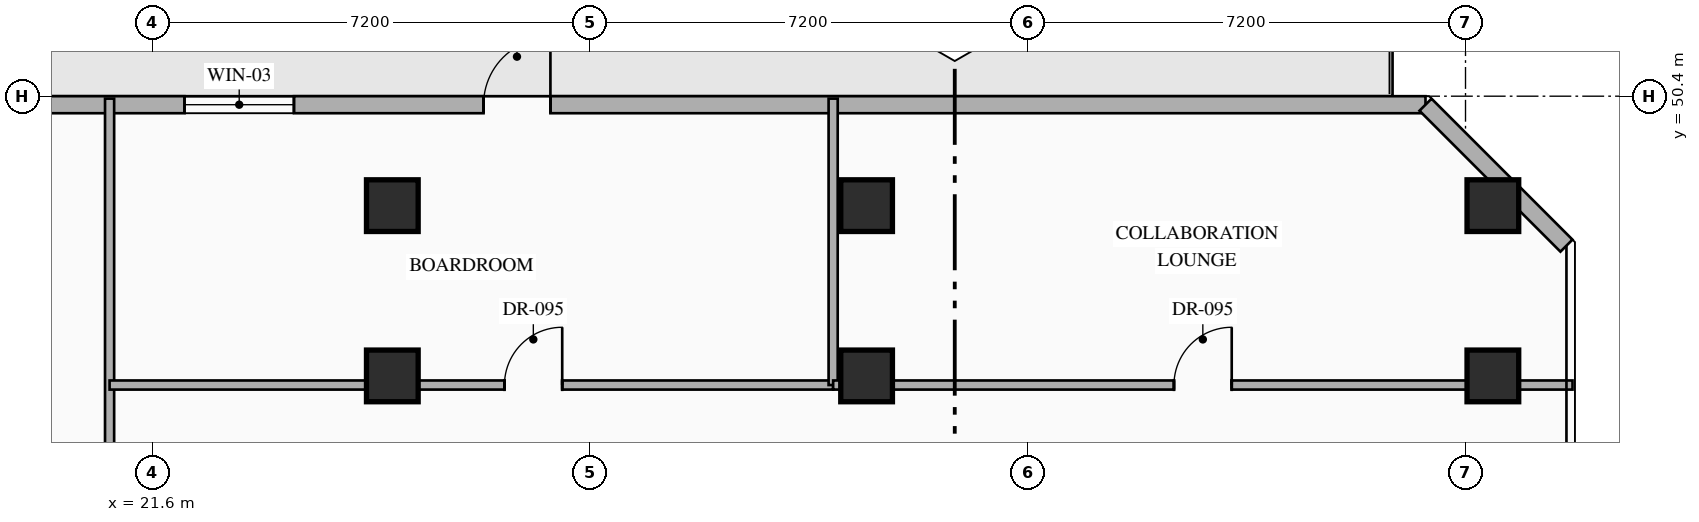
"""IFC4 building model, lengths in metres.
Left out: names, types, materials, properties, quantities, classifications, styles, units other than length and angle.
Written with IfcOpenShell. Run it as: python <this file> out.ifc"""

import sys

from ifc_helpers import new_model, si_unit, direction, frame, frame_2d, origin, origin_2d, place, context, subcontext, project, spatial, rectangle, hollow_rectangle, extrude, element, fill, save


model = new_model("IFC4")
c1 = context("Model", 3, precision=1e-05, world=origin(), true_north=direction((0.0, 1.0)))
c2 = subcontext(c1, "Body", "Model", "MODEL_VIEW")
j1 = project(units=[si_unit("LENGTHUNIT", "METRE"), si_unit("PLANEANGLEUNIT", "RADIAN")], contexts=[c1])
p1 = place(None, origin())
s1 = spatial("IfcSite", under=j1, at=p1, CompositionType="ELEMENT")
p2 = place(p1, origin())
s2 = spatial("IfcBuilding", under=s1, at=p2, CompositionType="ELEMENT")
p3 = place(p2, frame((0.0, 0.0, 156.45)))
s3 = spatial("IfcBuildingStorey", under=s2, at=p3, CompositionType="ELEMENT", Elevation=156.45)
for number, where, z_axis, x_axis in (
    (1, (25.55, 45.8, 0.0), (0.0, 0.0, 1.0), (1.0, 0.0, 0.0)),
    (2, (33.35, 45.8, 0.0), (0.0, 0.0, 1.0), (1.0, 0.0, 0.0)),
    (3, (43.65, 45.8, 0.0), (0.0, 0.0, 1.0), (1.0, 0.0, 0.0)),
    (4, (25.55, 48.6, 0.0), (0.0, 0.0, 1.0), (1.0, 0.0, 0.0)),
    (5, (33.35, 48.6, 0.0), (0.0, 0.0, 1.0), (1.0, 0.0, 0.0)),
    (6, (43.65, 48.6, 0.0), (0.0, 0.0, 1.0), (1.0, 0.0, 0.0)),
):
    element("IfcColumn", number, at=place(p3, frame(where, z_axis=z_axis, x_axis=x_axis)), inside=s3, PredefinedType="COLUMN", context=c2, shape_type="SweptSolid", body=[
        extrude(hollow_rectangle(XDim=0.85, YDim=0.85, WallThickness=0.032, at=origin_2d()), origin(), (0.0, 0.0, 1.0), 3.6),
    ])
p4 = place(p3, frame((12.058, 50.26, 0.0), z_axis=(0.0, 0.0, 1.0), x_axis=(1.0, 0.0, 0.0)))
e7 = element("IfcWall", 7, at=p4, inside=s3, PredefinedType="STANDARD", context=c2, shape_type="SweptSolid", body=[
    extrude(rectangle(XDim=30.484, YDim=0.28, at=frame_2d((15.242, 0.0))), origin(), (0.0, 0.0, 1.0), 3.35),
])
p5 = place(p4, frame((14.992, 0.0, 0.0)))
e8 = element("IfcOpeningElement", 8, at=p5, cuts=e7, PredefinedType="OPENING", context=c2, shape_type="SweptSolid", body=[
    extrude(rectangle(XDim=1.1, YDim=2.2, at=frame_2d((0.55, 1.1))), frame((0.0, 0.15, 0.0), z_axis=(0.0, -1.0, 0.0), x_axis=(1.0, 0.0, 0.0)), (0.0, 0.0, 1.0), 0.3),
])
p6 = place(p4, frame((10.074, 0.0, 0.85)))
e9 = element("IfcOpeningElement", 9, at=p6, cuts=e7, PredefinedType="OPENING", context=c2, shape_type="SweptSolid", body=[
    extrude(rectangle(XDim=1.8, YDim=2.1, at=frame_2d((0.9, 1.05))), frame((0.0, 0.15, 0.0), z_axis=(0.0, -1.0, 0.0), x_axis=(1.0, 0.0, 0.0)), (0.0, 0.0, 1.0), 0.3),
])
p7 = place(p3, frame((42.542, 50.26, 0.0), z_axis=(0.0, 0.0, 1.0), x_axis=(0.707106781187, -0.707106781187, 0.0)))
e10 = element("IfcWall", 10, at=p7, inside=s3, PredefinedType="STANDARD", context=c2, shape_type="SweptSolid", body=[
    extrude(rectangle(XDim=3.278, YDim=0.28, at=frame_2d((1.639, 0.0))), origin(), (0.0, 0.0, 1.0), 3.35),
])
p8 = place(p3, frame((20.9, 35.8, 0.0), z_axis=(0.0, 0.0, 1.0), x_axis=(0.0, 1.0, 0.0)))
e11 = element("IfcWall", 11, at=p8, inside=s3, PredefinedType="PARTITIONING", context=c2, shape_type="SweptSolid", body=[
    extrude(rectangle(XDim=14.56, YDim=0.15, at=frame_2d((7.28, 0.0))), origin(), (0.0, 0.0, 1.0), 3.35),
])
p9 = place(p8, frame((7.448, 0.0, 0.0)))
e12 = element("IfcOpeningElement", 12, at=p9, cuts=e11, PredefinedType="OPENING", context=c2, shape_type="SweptSolid", body=[
    extrude(rectangle(XDim=0.95, YDim=2.15, at=frame_2d((0.475, 1.075))), frame((0.0, 0.085, 0.0), z_axis=(0.0, -1.0, 0.0), x_axis=(1.0, 0.0, 0.0)), (0.0, 0.0, 1.0), 0.17),
])
p10 = place(p3, frame((20.9, 45.65, 0.0), z_axis=(0.0, 0.0, 1.0), x_axis=(1.0, 0.0, 0.0)))
e13 = element("IfcWall", 13, at=p10, inside=s3, PredefinedType="PARTITIONING", context=c2, shape_type="SweptSolid", body=[
    extrude(rectangle(XDim=11.9, YDim=0.15, at=frame_2d((5.95, 0.0))), origin(), (0.0, 0.0, 1.0), 2.695),
])
p11 = place(p10, frame((6.494, 0.0, 0.0)))
e14 = element("IfcOpeningElement", 14, at=p11, cuts=e13, PredefinedType="OPENING", context=c2, shape_type="SweptSolid", body=[
    extrude(rectangle(XDim=0.95, YDim=2.15, at=frame_2d((0.475, 1.075))), frame((0.0, 0.085, 0.0), z_axis=(0.0, -1.0, 0.0), x_axis=(1.0, 0.0, 0.0)), (0.0, 0.0, 1.0), 0.17),
])
p12 = place(p3, frame((32.8, 45.65, 0.0), z_axis=(0.0, 0.0, 1.0), x_axis=(0.0, 1.0, 0.0)))
e15 = element("IfcWall", 15, at=p12, inside=s3, PredefinedType="PARTITIONING", context=c2, shape_type="SweptSolid", body=[
    extrude(rectangle(XDim=4.71, YDim=0.15, at=frame_2d((2.355, 0.0))), origin(), (0.0, 0.0, 1.0), 3.35),
])
p13 = place(p3, frame((32.8, 45.65, 0.0), z_axis=(0.0, 0.0, 1.0), x_axis=(1.0, 0.0, 0.0)))
e16 = element("IfcWall", 16, at=p13, inside=s3, PredefinedType="PARTITIONING", context=c2, shape_type="SweptSolid", body=[
    extrude(rectangle(XDim=12.16, YDim=0.15, at=frame_2d((6.08, 0.0))), origin(), (0.0, 0.0, 1.0), 2.695),
])
p14 = place(p13, frame((5.605, 0.0, 0.0)))
e17 = element("IfcOpeningElement", 17, at=p14, cuts=e16, PredefinedType="OPENING", context=c2, shape_type="SweptSolid", body=[
    extrude(rectangle(XDim=0.95, YDim=2.15, at=frame_2d((0.475, 1.075))), frame((0.0, 0.085, 0.0), z_axis=(0.0, -1.0, 0.0), x_axis=(1.0, 0.0, 0.0)), (0.0, 0.0, 1.0), 0.17),
])
p15 = place(p5, origin())
e18 = element("IfcDoor", 18, at=p15, inside=s3, OperationType="SINGLE_SWING_RIGHT", PredefinedType="DOOR", context=c2, shape_type="SweptSolid", body=[
    extrude(rectangle(XDim=1.1, YDim=2.2, at=frame_2d((0.55, 1.1))), frame((0.0, 0.025, 0.0), z_axis=(0.0, -1.0, 0.0), x_axis=(1.0, 0.0, 0.0)), (0.0, 0.0, 1.0), 0.05),
])
fill(e8, e18)
p16 = place(p6, origin())
e19 = element("IfcWindow", 19, at=p16, inside=s3, PartitioningType="SINGLE_PANEL", PredefinedType="WINDOW", context=c2, shape_type="SweptSolid", body=[
    extrude(rectangle(XDim=1.8, YDim=2.1, at=frame_2d((0.9, 1.05))), frame((0.0, 0.03, 0.0), z_axis=(0.0, -1.0, 0.0), x_axis=(1.0, 0.0, 0.0)), (0.0, 0.0, 1.0), 0.06),
])
fill(e9, e19)
p17 = place(p11, origin())
e20 = element("IfcDoor", 20, at=p17, inside=s3, OperationType="SINGLE_SWING_RIGHT", PredefinedType="DOOR", context=c2, shape_type="SweptSolid", body=[
    extrude(rectangle(XDim=0.95, YDim=2.15, at=frame_2d((0.475, 1.075))), frame((0.0, 0.025, 0.0), z_axis=(0.0, -1.0, 0.0), x_axis=(1.0, 0.0, 0.0)), (0.0, 0.0, 1.0), 0.05),
])
fill(e14, e20)
p18 = place(p14, origin())
e21 = element("IfcDoor", 21, at=p18, inside=s3, OperationType="SINGLE_SWING_RIGHT", PredefinedType="DOOR", context=c2, shape_type="SweptSolid", body=[
    extrude(rectangle(XDim=0.95, YDim=2.15, at=frame_2d((0.475, 1.075))), frame((0.0, 0.025, 0.0), z_axis=(0.0, -1.0, 0.0), x_axis=(1.0, 0.0, 0.0)), (0.0, 0.0, 1.0), 0.05),
])
fill(e17, e21)
save(model, sys.argv[1])
